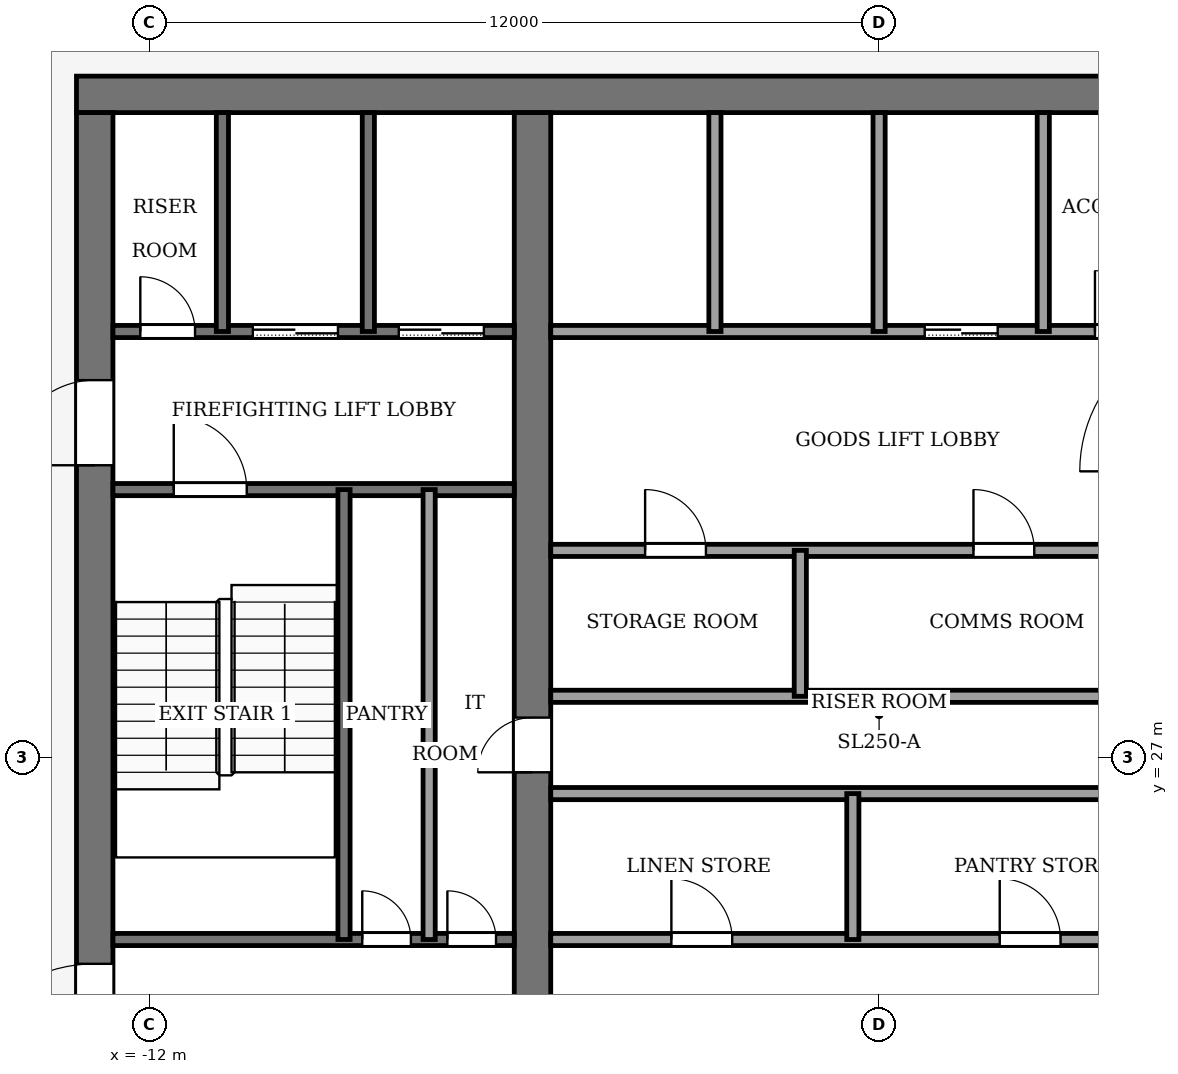
"""IFC4 building model, lengths in metres.
Left out: names, types, materials, properties, quantities, classifications, styles, units other than length and angle.
Written with IfcOpenShell. Run it as: python <this file> out.ifc"""

import sys

from ifc_helpers import new_model, si_unit, direction, frame, frame_2d, origin, place, context, subcontext, project, spatial, rectangle, extrude, element, fill, save


model = new_model("IFC4")
c1 = context("Model", 3, precision=1e-05, world=origin(), true_north=direction((0.0, 1.0)))
c2 = subcontext(c1, "Body", "Model", "MODEL_VIEW")
j1 = project(units=[si_unit("LENGTHUNIT", "METRE"), si_unit("PLANEANGLEUNIT", "RADIAN")], contexts=[c1])
p1 = place(None, origin())
s1 = spatial("IfcSite", under=j1, at=p1, CompositionType="ELEMENT")
p2 = place(p1, origin())
s2 = spatial("IfcBuilding", under=s1, at=p2, CompositionType="ELEMENT")
p3 = place(p2, frame((0.0, 0.0, 322.0)))
s3 = spatial("IfcBuildingStorey", under=s2, at=p3, CompositionType="ELEMENT", Elevation=322.0)
p4 = place(p3, frame((-13.2, 37.9, -0.13), z_axis=(0.0, 0.0, 1.0), x_axis=(1.0, 0.0, 0.0)))
e1 = element("IfcWall", 1, at=p4, inside=s3, PredefinedType="SHEAR", context=c2, shape_type="SweptSolid", body=[
    extrude(rectangle(XDim=26.4, YDim=0.6, at=frame_2d((13.2, 0.0))), origin(), (0.0, 0.0, 1.0), 4.0),
])
p5 = place(p3, frame((-12.9, 18.4, -0.13), z_axis=(0.0, 0.0, 1.0), x_axis=(0.0, 1.0, 0.0)))
e2 = element("IfcWall", 2, at=p5, inside=s3, PredefinedType="SHEAR", context=c2, shape_type="SweptSolid", body=[
    extrude(rectangle(XDim=19.2, YDim=0.6, at=frame_2d((9.6, 0.0))), origin(), (0.0, 0.0, 1.0), 4.0),
])
p6 = place(p5, frame((2.8, 0.0, 0.13)))
e3 = element("IfcOpeningElement", 3, at=p6, cuts=e2, PredefinedType="OPENING", context=c2, shape_type="SweptSolid", body=[
    extrude(rectangle(XDim=2.4, YDim=2.4, at=frame_2d((1.2, 1.2))), frame((0.0, 0.31, 0.0), z_axis=(0.0, -1.0, 0.0), x_axis=(1.0, 0.0, 0.0)), (0.0, 0.0, 1.0), 0.62),
])
p7 = place(p5, frame((13.4, 0.0, 0.13)))
e4 = element("IfcOpeningElement", 4, at=p7, cuts=e2, PredefinedType="OPENING", context=c2, shape_type="SweptSolid", body=[
    extrude(rectangle(XDim=1.4, YDim=2.2, at=frame_2d((0.7, 1.1))), frame((0.0, 0.31, 0.0), z_axis=(0.0, -1.0, 0.0), x_axis=(1.0, 0.0, 0.0)), (0.0, 0.0, 1.0), 0.62),
])
p8 = place(p3, frame((-5.7, 18.4, -0.13), z_axis=(0.0, 0.0, 1.0), x_axis=(0.0, 1.0, 0.0)))
e5 = element("IfcWall", 5, at=p8, inside=s3, PredefinedType="SHEAR", context=c2, shape_type="SweptSolid", body=[
    extrude(rectangle(XDim=19.2, YDim=0.6, at=frame_2d((9.6, 0.0))), origin(), (0.0, 0.0, 1.0), 4.0),
])
p9 = place(p8, frame((8.35, 0.0, 0.13)))
e6 = element("IfcOpeningElement", 6, at=p9, cuts=e5, PredefinedType="OPENING", context=c2, shape_type="SweptSolid", body=[
    extrude(rectangle(XDim=0.9, YDim=2.1, at=frame_2d((0.45, 1.05))), frame((0.0, 0.31, 0.0), z_axis=(0.0, -1.0, 0.0), x_axis=(1.0, 0.0, 0.0)), (0.0, 0.0, 1.0), 0.62),
])
p10 = place(p3, frame((-12.6, 24.0, 0.0), z_axis=(0.0, 0.0, 1.0), x_axis=(1.0, 0.0, 0.0)))
e7 = element("IfcWall", 7, at=p10, inside=s3, PredefinedType="PARTITIONING", context=c2, shape_type="SweptSolid", body=[
    extrude(rectangle(XDim=6.6, YDim=0.2, at=frame_2d((3.3, 0.0))), origin(), (0.0, 0.0, 1.0), 3.87),
])
p11 = place(p10, frame((4.1, 0.0, 0.0)))
e8 = element("IfcOpeningElement", 8, at=p11, cuts=e7, PredefinedType="OPENING", context=c2, shape_type="SweptSolid", body=[
    extrude(rectangle(XDim=0.8, YDim=2.1, at=frame_2d((0.4, 1.05))), frame((0.0, 0.11, 0.0), z_axis=(0.0, -1.0, 0.0), x_axis=(1.0, 0.0, 0.0)), (0.0, 0.0, 1.0), 0.22),
])
p12 = place(p10, frame((5.5, 0.0, 0.0)))
e9 = element("IfcOpeningElement", 9, at=p12, cuts=e7, PredefinedType="OPENING", context=c2, shape_type="SweptSolid", body=[
    extrude(rectangle(XDim=0.8, YDim=2.1, at=frame_2d((0.4, 1.05))), frame((0.0, 0.11, 0.0), z_axis=(0.0, -1.0, 0.0), x_axis=(1.0, 0.0, 0.0)), (0.0, 0.0, 1.0), 0.22),
])
p13 = place(p3, frame((-5.4, 24.0, 0.0), z_axis=(0.0, 0.0, 1.0), x_axis=(1.0, 0.0, 0.0)))
e10 = element("IfcWall", 10, at=p13, inside=s3, PredefinedType="PARTITIONING", context=c2, shape_type="SweptSolid", body=[
    extrude(rectangle(XDim=10.8, YDim=0.2, at=frame_2d((5.4, 0.0))), origin(), (0.0, 0.0, 1.0), 3.87),
])
p14 = place(p13, frame((1.984, 0.0, 0.0)))
e11 = element("IfcOpeningElement", 11, at=p14, cuts=e10, PredefinedType="OPENING", context=c2, shape_type="SweptSolid", body=[
    extrude(rectangle(XDim=1.0, YDim=2.1, at=frame_2d((0.5, 1.05))), frame((0.0, 0.11, 0.0), z_axis=(0.0, -1.0, 0.0), x_axis=(1.0, 0.0, 0.0)), (0.0, 0.0, 1.0), 0.22),
])
p15 = place(p13, frame((7.384, 0.0, 0.0)))
e12 = element("IfcOpeningElement", 12, at=p15, cuts=e10, PredefinedType="OPENING", context=c2, shape_type="SweptSolid", body=[
    extrude(rectangle(XDim=1.0, YDim=2.1, at=frame_2d((0.5, 1.05))), frame((0.0, 0.11, 0.0), z_axis=(0.0, -1.0, 0.0), x_axis=(1.0, 0.0, 0.0)), (0.0, 0.0, 1.0), 0.22),
])
for number, where, z_axis, x_axis in (
    (13, (-5.4, 26.4, 0.0), (0.0, 0.0, 1.0), (1.0, 0.0, 0.0)),
    (14, (-5.4, 28.0, 0.0), (0.0, 0.0, 1.0), (1.0, 0.0, 0.0)),
):
    element("IfcWall", number, at=place(p3, frame(where, z_axis=z_axis, x_axis=x_axis)), inside=s3, PredefinedType="PARTITIONING", context=c2, shape_type="SweptSolid", body=[
        extrude(rectangle(XDim=10.8, YDim=0.2, at=frame_2d((5.4, 0.0))), origin(), (0.0, 0.0, 1.0), 3.87),
    ])
p16 = place(p3, frame((-5.4, 30.4, 0.0), z_axis=(0.0, 0.0, 1.0), x_axis=(1.0, 0.0, 0.0)))
e15 = element("IfcWall", 15, at=p16, inside=s3, PredefinedType="PARTITIONING", context=c2, shape_type="SweptSolid", body=[
    extrude(rectangle(XDim=10.8, YDim=0.2, at=frame_2d((5.4, 0.0))), origin(), (0.0, 0.0, 1.0), 3.87),
])
p17 = place(p16, frame((1.552, 0.0, 0.0)))
e16 = element("IfcOpeningElement", 16, at=p17, cuts=e15, PredefinedType="OPENING", context=c2, shape_type="SweptSolid", body=[
    extrude(rectangle(XDim=1.0, YDim=2.1, at=frame_2d((0.5, 1.05))), frame((0.0, 0.11, 0.0), z_axis=(0.0, -1.0, 0.0), x_axis=(1.0, 0.0, 0.0)), (0.0, 0.0, 1.0), 0.22),
])
p18 = place(p16, frame((6.952, 0.0, 0.0)))
e17 = element("IfcOpeningElement", 17, at=p18, cuts=e15, PredefinedType="OPENING", context=c2, shape_type="SweptSolid", body=[
    extrude(rectangle(XDim=1.0, YDim=2.1, at=frame_2d((0.5, 1.05))), frame((0.0, 0.11, 0.0), z_axis=(0.0, -1.0, 0.0), x_axis=(1.0, 0.0, 0.0)), (0.0, 0.0, 1.0), 0.22),
])
p19 = place(p3, frame((-12.6, 31.4, 0.0), z_axis=(0.0, 0.0, 1.0), x_axis=(1.0, 0.0, 0.0)))
e18 = element("IfcWall", 18, at=p19, inside=s3, PredefinedType="PARTITIONING", context=c2, shape_type="SweptSolid", body=[
    extrude(rectangle(XDim=6.6, YDim=0.2, at=frame_2d((3.3, 0.0))), origin(), (0.0, 0.0, 1.0), 3.87),
])
p20 = place(p19, frame((1.0, 0.0, 0.0)))
e19 = element("IfcOpeningElement", 19, at=p20, cuts=e18, PredefinedType="OPENING", context=c2, shape_type="SweptSolid", body=[
    extrude(rectangle(XDim=1.2, YDim=2.2, at=frame_2d((0.6, 1.1))), frame((0.0, 0.11, 0.0), z_axis=(0.0, -1.0, 0.0), x_axis=(1.0, 0.0, 0.0)), (0.0, 0.0, 1.0), 0.22),
])
p21 = place(p3, frame((-12.6, 34.0, 0.0), z_axis=(0.0, 0.0, 1.0), x_axis=(1.0, 0.0, 0.0)))
e20 = element("IfcWall", 20, at=p21, inside=s3, PredefinedType="PARTITIONING", context=c2, shape_type="SweptSolid", body=[
    extrude(rectangle(XDim=6.6, YDim=0.2, at=frame_2d((3.3, 0.0))), origin(), (0.0, 0.0, 1.0), 3.87),
])
p22 = place(p21, frame((4.7, 0.0, 0.0)))
e21 = element("IfcOpeningElement", 21, at=p22, cuts=e20, PredefinedType="OPENING", context=c2, shape_type="SweptSolid", body=[
    extrude(rectangle(XDim=1.4, YDim=2.2, at=frame_2d((0.7, 1.1))), frame((0.0, 0.11, 0.0), z_axis=(0.0, -1.0, 0.0), x_axis=(1.0, 0.0, 0.0)), (0.0, 0.0, 1.0), 0.22),
])
p23 = place(p21, frame((2.3, 0.0, 0.0)))
e22 = element("IfcOpeningElement", 22, at=p23, cuts=e20, PredefinedType="OPENING", context=c2, shape_type="SweptSolid", body=[
    extrude(rectangle(XDim=1.4, YDim=2.2, at=frame_2d((0.7, 1.1))), frame((0.0, 0.11, 0.0), z_axis=(0.0, -1.0, 0.0), x_axis=(1.0, 0.0, 0.0)), (0.0, 0.0, 1.0), 0.22),
])
p24 = place(p21, frame((0.45, 0.0, 0.0)))
e23 = element("IfcOpeningElement", 23, at=p24, cuts=e20, PredefinedType="OPENING", context=c2, shape_type="SweptSolid", body=[
    extrude(rectangle(XDim=0.9, YDim=2.1, at=frame_2d((0.45, 1.05))), frame((0.0, 0.11, 0.0), z_axis=(0.0, -1.0, 0.0), x_axis=(1.0, 0.0, 0.0)), (0.0, 0.0, 1.0), 0.22),
])
p25 = place(p3, frame((-5.4, 34.0, 0.0), z_axis=(0.0, 0.0, 1.0), x_axis=(1.0, 0.0, 0.0)))
e24 = element("IfcWall", 24, at=p25, inside=s3, PredefinedType="PARTITIONING", context=c2, shape_type="SweptSolid", body=[
    extrude(rectangle(XDim=10.8, YDim=0.2, at=frame_2d((5.4, 0.0))), origin(), (0.0, 0.0, 1.0), 3.87),
])
p26 = place(p25, frame((6.15, 0.0, 0.0)))
e25 = element("IfcOpeningElement", 25, at=p26, cuts=e24, PredefinedType="OPENING", context=c2, shape_type="SweptSolid", body=[
    extrude(rectangle(XDim=1.2, YDim=2.2, at=frame_2d((0.6, 1.1))), frame((0.0, 0.11, 0.0), z_axis=(0.0, -1.0, 0.0), x_axis=(1.0, 0.0, 0.0)), (0.0, 0.0, 1.0), 0.22),
])
p27 = place(p25, frame((8.95, 0.0, 0.0)))
e26 = element("IfcOpeningElement", 26, at=p27, cuts=e24, PredefinedType="OPENING", context=c2, shape_type="SweptSolid", body=[
    extrude(rectangle(XDim=1.0, YDim=2.1, at=frame_2d((0.5, 1.05))), frame((0.0, 0.11, 0.0), z_axis=(0.0, -1.0, 0.0), x_axis=(1.0, 0.0, 0.0)), (0.0, 0.0, 1.0), 0.22),
])
p28 = place(p3, frame((-10.8, 34.0, 0.0), z_axis=(0.0, 0.0, 1.0), x_axis=(0.0, 1.0, 0.0)))
e27 = element("IfcWall", 27, at=p28, inside=s3, PredefinedType="PARTITIONING", context=c2, shape_type="SweptSolid", body=[
    extrude(rectangle(XDim=3.6, YDim=0.2, at=frame_2d((1.8, 0.0))), origin(), (0.0, 0.0, 1.0), 3.87),
])
p29 = place(p3, frame((-8.8, 24.0, 0.0), z_axis=(0.0, 0.0, 1.0), x_axis=(0.0, 1.0, 0.0)))
e28 = element("IfcWall", 28, at=p29, inside=s3, PredefinedType="PARTITIONING", context=c2, shape_type="SweptSolid", body=[
    extrude(rectangle(XDim=7.4, YDim=0.2, at=frame_2d((3.7, 0.0))), origin(), (0.0, 0.0, 1.0), 3.87),
])
p30 = place(p3, frame((-8.4, 34.0, 0.0), z_axis=(0.0, 0.0, 1.0), x_axis=(0.0, 1.0, 0.0)))
e29 = element("IfcWall", 29, at=p30, inside=s3, PredefinedType="PARTITIONING", context=c2, shape_type="SweptSolid", body=[
    extrude(rectangle(XDim=3.6, YDim=0.2, at=frame_2d((1.8, 0.0))), origin(), (0.0, 0.0, 1.0), 3.87),
])
p31 = place(p3, frame((-7.4, 24.0, 0.0), z_axis=(0.0, 0.0, 1.0), x_axis=(0.0, 1.0, 0.0)))
e30 = element("IfcWall", 30, at=p31, inside=s3, PredefinedType="PARTITIONING", context=c2, shape_type="SweptSolid", body=[
    extrude(rectangle(XDim=7.4, YDim=0.2, at=frame_2d((3.7, 0.0))), origin(), (0.0, 0.0, 1.0), 3.87),
])
p32 = place(p3, frame((-2.7, 34.0, 0.0), z_axis=(0.0, 0.0, 1.0), x_axis=(0.0, 1.0, 0.0)))
e31 = element("IfcWall", 31, at=p32, inside=s3, PredefinedType="PARTITIONING", context=c2, shape_type="SweptSolid", body=[
    extrude(rectangle(XDim=3.6, YDim=0.2, at=frame_2d((1.8, 0.0))), origin(), (0.0, 0.0, 1.0), 3.87),
])
for number, where, z_axis, x_axis in (
    (32, (-1.296, 28.0, 0.0), (0.0, 0.0, 1.0), (0.0, 1.0, 0.0)),
    (33, (-0.432, 24.0, 0.0), (0.0, 0.0, 1.0), (0.0, 1.0, 0.0)),
):
    element("IfcWall", number, at=place(p3, frame(where, z_axis=z_axis, x_axis=x_axis)), inside=s3, PredefinedType="PARTITIONING", context=c2, shape_type="SweptSolid", body=[
        extrude(rectangle(XDim=2.4, YDim=0.2, at=frame_2d((1.2, 0.0))), origin(), (0.0, 0.0, 1.0), 3.87),
    ])
for number, where, z_axis, x_axis in (
    (34, (0.0, 34.0, 0.0), (0.0, 0.0, 1.0), (0.0, 1.0, 0.0)),
    (35, (2.7, 34.0, 0.0), (0.0, 0.0, 1.0), (0.0, 1.0, 0.0)),
):
    element("IfcWall", number, at=place(p3, frame(where, z_axis=z_axis, x_axis=x_axis)), inside=s3, PredefinedType="PARTITIONING", context=c2, shape_type="SweptSolid", body=[
        extrude(rectangle(XDim=3.6, YDim=0.2, at=frame_2d((1.8, 0.0))), origin(), (0.0, 0.0, 1.0), 3.87),
    ])
p33 = place(p26, origin())
e36 = element("IfcDoor", 36, at=p33, inside=s3, OperationType="SLIDING_TO_LEFT", PredefinedType="DOOR", context=c2, shape_type="SweptSolid", body=[
    extrude(rectangle(XDim=1.2, YDim=2.2, at=frame_2d((0.6, 1.1))), frame((0.0, 0.025, 0.0), z_axis=(0.0, -1.0, 0.0), x_axis=(1.0, 0.0, 0.0)), (0.0, 0.0, 1.0), 0.05),
])
fill(e25, e36)
p34 = place(p22, origin())
e37 = element("IfcDoor", 37, at=p34, inside=s3, OperationType="SLIDING_TO_LEFT", PredefinedType="DOOR", context=c2, shape_type="SweptSolid", body=[
    extrude(rectangle(XDim=1.4, YDim=2.2, at=frame_2d((0.7, 1.1))), frame((0.0, 0.025, 0.0), z_axis=(0.0, -1.0, 0.0), x_axis=(1.0, 0.0, 0.0)), (0.0, 0.0, 1.0), 0.05),
])
fill(e21, e37)
p35 = place(p23, origin())
e38 = element("IfcDoor", 38, at=p35, inside=s3, OperationType="SLIDING_TO_LEFT", PredefinedType="DOOR", context=c2, shape_type="SweptSolid", body=[
    extrude(rectangle(XDim=1.4, YDim=2.2, at=frame_2d((0.7, 1.1))), frame((0.0, 0.025, 0.0), z_axis=(0.0, -1.0, 0.0), x_axis=(1.0, 0.0, 0.0)), (0.0, 0.0, 1.0), 0.05),
])
fill(e22, e38)
p36 = place(p24, origin())
e39 = element("IfcDoor", 39, at=p36, inside=s3, OperationType="SINGLE_SWING_RIGHT", PredefinedType="DOOR", context=c2, shape_type="SweptSolid", body=[
    extrude(rectangle(XDim=0.9, YDim=2.1, at=frame_2d((0.45, 1.05))), frame((0.0, 0.025, 0.0), z_axis=(0.0, -1.0, 0.0), x_axis=(1.0, 0.0, 0.0)), (0.0, 0.0, 1.0), 0.05),
])
fill(e23, e39)
p37 = place(p14, origin())
e40 = element("IfcDoor", 40, at=p37, inside=s3, OperationType="SINGLE_SWING_LEFT", PredefinedType="DOOR", context=c2, shape_type="SweptSolid", body=[
    extrude(rectangle(XDim=1.0, YDim=2.1, at=frame_2d((0.5, 1.05))), frame((0.0, 0.025, 0.0), z_axis=(0.0, -1.0, 0.0), x_axis=(1.0, 0.0, 0.0)), (0.0, 0.0, 1.0), 0.05),
])
fill(e11, e40)
p38 = place(p15, origin())
e41 = element("IfcDoor", 41, at=p38, inside=s3, OperationType="SINGLE_SWING_RIGHT", PredefinedType="DOOR", context=c2, shape_type="SweptSolid", body=[
    extrude(rectangle(XDim=1.0, YDim=2.1, at=frame_2d((0.5, 1.05))), frame((0.0, 0.025, 0.0), z_axis=(0.0, -1.0, 0.0), x_axis=(1.0, 0.0, 0.0)), (0.0, 0.0, 1.0), 0.05),
])
fill(e12, e41)
p39 = place(p17, origin())
e42 = element("IfcDoor", 42, at=p39, inside=s3, OperationType="SINGLE_SWING_LEFT", PredefinedType="DOOR", context=c2, shape_type="SweptSolid", body=[
    extrude(rectangle(XDim=1.0, YDim=2.1, at=frame_2d((0.5, 1.05))), frame((0.0, 0.025, 0.0), z_axis=(0.0, -1.0, 0.0), x_axis=(1.0, 0.0, 0.0)), (0.0, 0.0, 1.0), 0.05),
])
fill(e16, e42)
p40 = place(p18, origin())
e43 = element("IfcDoor", 43, at=p40, inside=s3, OperationType="SINGLE_SWING_RIGHT", PredefinedType="DOOR", context=c2, shape_type="SweptSolid", body=[
    extrude(rectangle(XDim=1.0, YDim=2.1, at=frame_2d((0.5, 1.05))), frame((0.0, 0.025, 0.0), z_axis=(0.0, -1.0, 0.0), x_axis=(1.0, 0.0, 0.0)), (0.0, 0.0, 1.0), 0.05),
])
fill(e17, e43)
p41 = place(p11, origin())
e44 = element("IfcDoor", 44, at=p41, inside=s3, OperationType="SINGLE_SWING_LEFT", PredefinedType="DOOR", context=c2, shape_type="SweptSolid", body=[
    extrude(rectangle(XDim=0.8, YDim=2.1, at=frame_2d((0.4, 1.05))), frame((0.0, 0.025, 0.0), z_axis=(0.0, -1.0, 0.0), x_axis=(1.0, 0.0, 0.0)), (0.0, 0.0, 1.0), 0.05),
])
fill(e8, e44)
p42 = place(p12, origin())
e45 = element("IfcDoor", 45, at=p42, inside=s3, OperationType="SINGLE_SWING_RIGHT", PredefinedType="DOOR", context=c2, shape_type="SweptSolid", body=[
    extrude(rectangle(XDim=0.8, YDim=2.1, at=frame_2d((0.4, 1.05))), frame((0.0, 0.025, 0.0), z_axis=(0.0, -1.0, 0.0), x_axis=(1.0, 0.0, 0.0)), (0.0, 0.0, 1.0), 0.05),
])
fill(e9, e45)
p43 = place(p27, origin())
e46 = element("IfcDoor", 46, at=p43, inside=s3, OperationType="SINGLE_SWING_LEFT", PredefinedType="DOOR", context=c2, shape_type="SweptSolid", body=[
    extrude(rectangle(XDim=1.0, YDim=2.1, at=frame_2d((0.5, 1.05))), frame((0.0, 0.025, 0.0), z_axis=(0.0, -1.0, 0.0), x_axis=(1.0, 0.0, 0.0)), (0.0, 0.0, 1.0), 0.05),
])
fill(e26, e46)
p44 = place(p9, origin())
e47 = element("IfcDoor", 47, at=p44, inside=s3, OperationType="SINGLE_SWING_RIGHT", PredefinedType="DOOR", context=c2, shape_type="SweptSolid", body=[
    extrude(rectangle(XDim=0.9, YDim=2.1, at=frame_2d((0.45, 1.05))), frame((0.0, 0.025, 0.0), z_axis=(0.0, -1.0, 0.0), x_axis=(1.0, 0.0, 0.0)), (0.0, 0.0, 1.0), 0.05),
])
fill(e6, e47)
p45 = place(p20, origin())
e48 = element("IfcDoor", 48, at=p45, inside=s3, OperationType="SINGLE_SWING_RIGHT", PredefinedType="DOOR", context=c2, shape_type="SweptSolid", body=[
    extrude(rectangle(XDim=1.2, YDim=2.2, at=frame_2d((0.6, 1.1))), frame((0.0, 0.025, 0.0), z_axis=(0.0, -1.0, 0.0), x_axis=(1.0, 0.0, 0.0)), (0.0, 0.0, 1.0), 0.05),
])
fill(e19, e48)
p46 = place(p6, origin())
e49 = element("IfcDoor", 49, at=p46, inside=s3, OperationType="DOUBLE_DOOR_SINGLE_SWING", PredefinedType="DOOR", context=c2, shape_type="SweptSolid", body=[
    extrude(rectangle(XDim=2.4, YDim=2.4, at=frame_2d((1.2, 1.2))), frame((0.0, 0.025, 0.0), z_axis=(0.0, -1.0, 0.0), x_axis=(1.0, 0.0, 0.0)), (0.0, 0.0, 1.0), 0.05),
])
fill(e3, e49)
p47 = place(p7, origin())
e50 = element("IfcDoor", 50, at=p47, inside=s3, OperationType="SINGLE_SWING_RIGHT", PredefinedType="DOOR", context=c2, shape_type="SweptSolid", body=[
    extrude(rectangle(XDim=1.4, YDim=2.2, at=frame_2d((0.7, 1.1))), frame((0.0, 0.025, 0.0), z_axis=(0.0, -1.0, 0.0), x_axis=(1.0, 0.0, 0.0)), (0.0, 0.0, 1.0), 0.05),
])
fill(e4, e50)
save(model, sys.argv[1])
